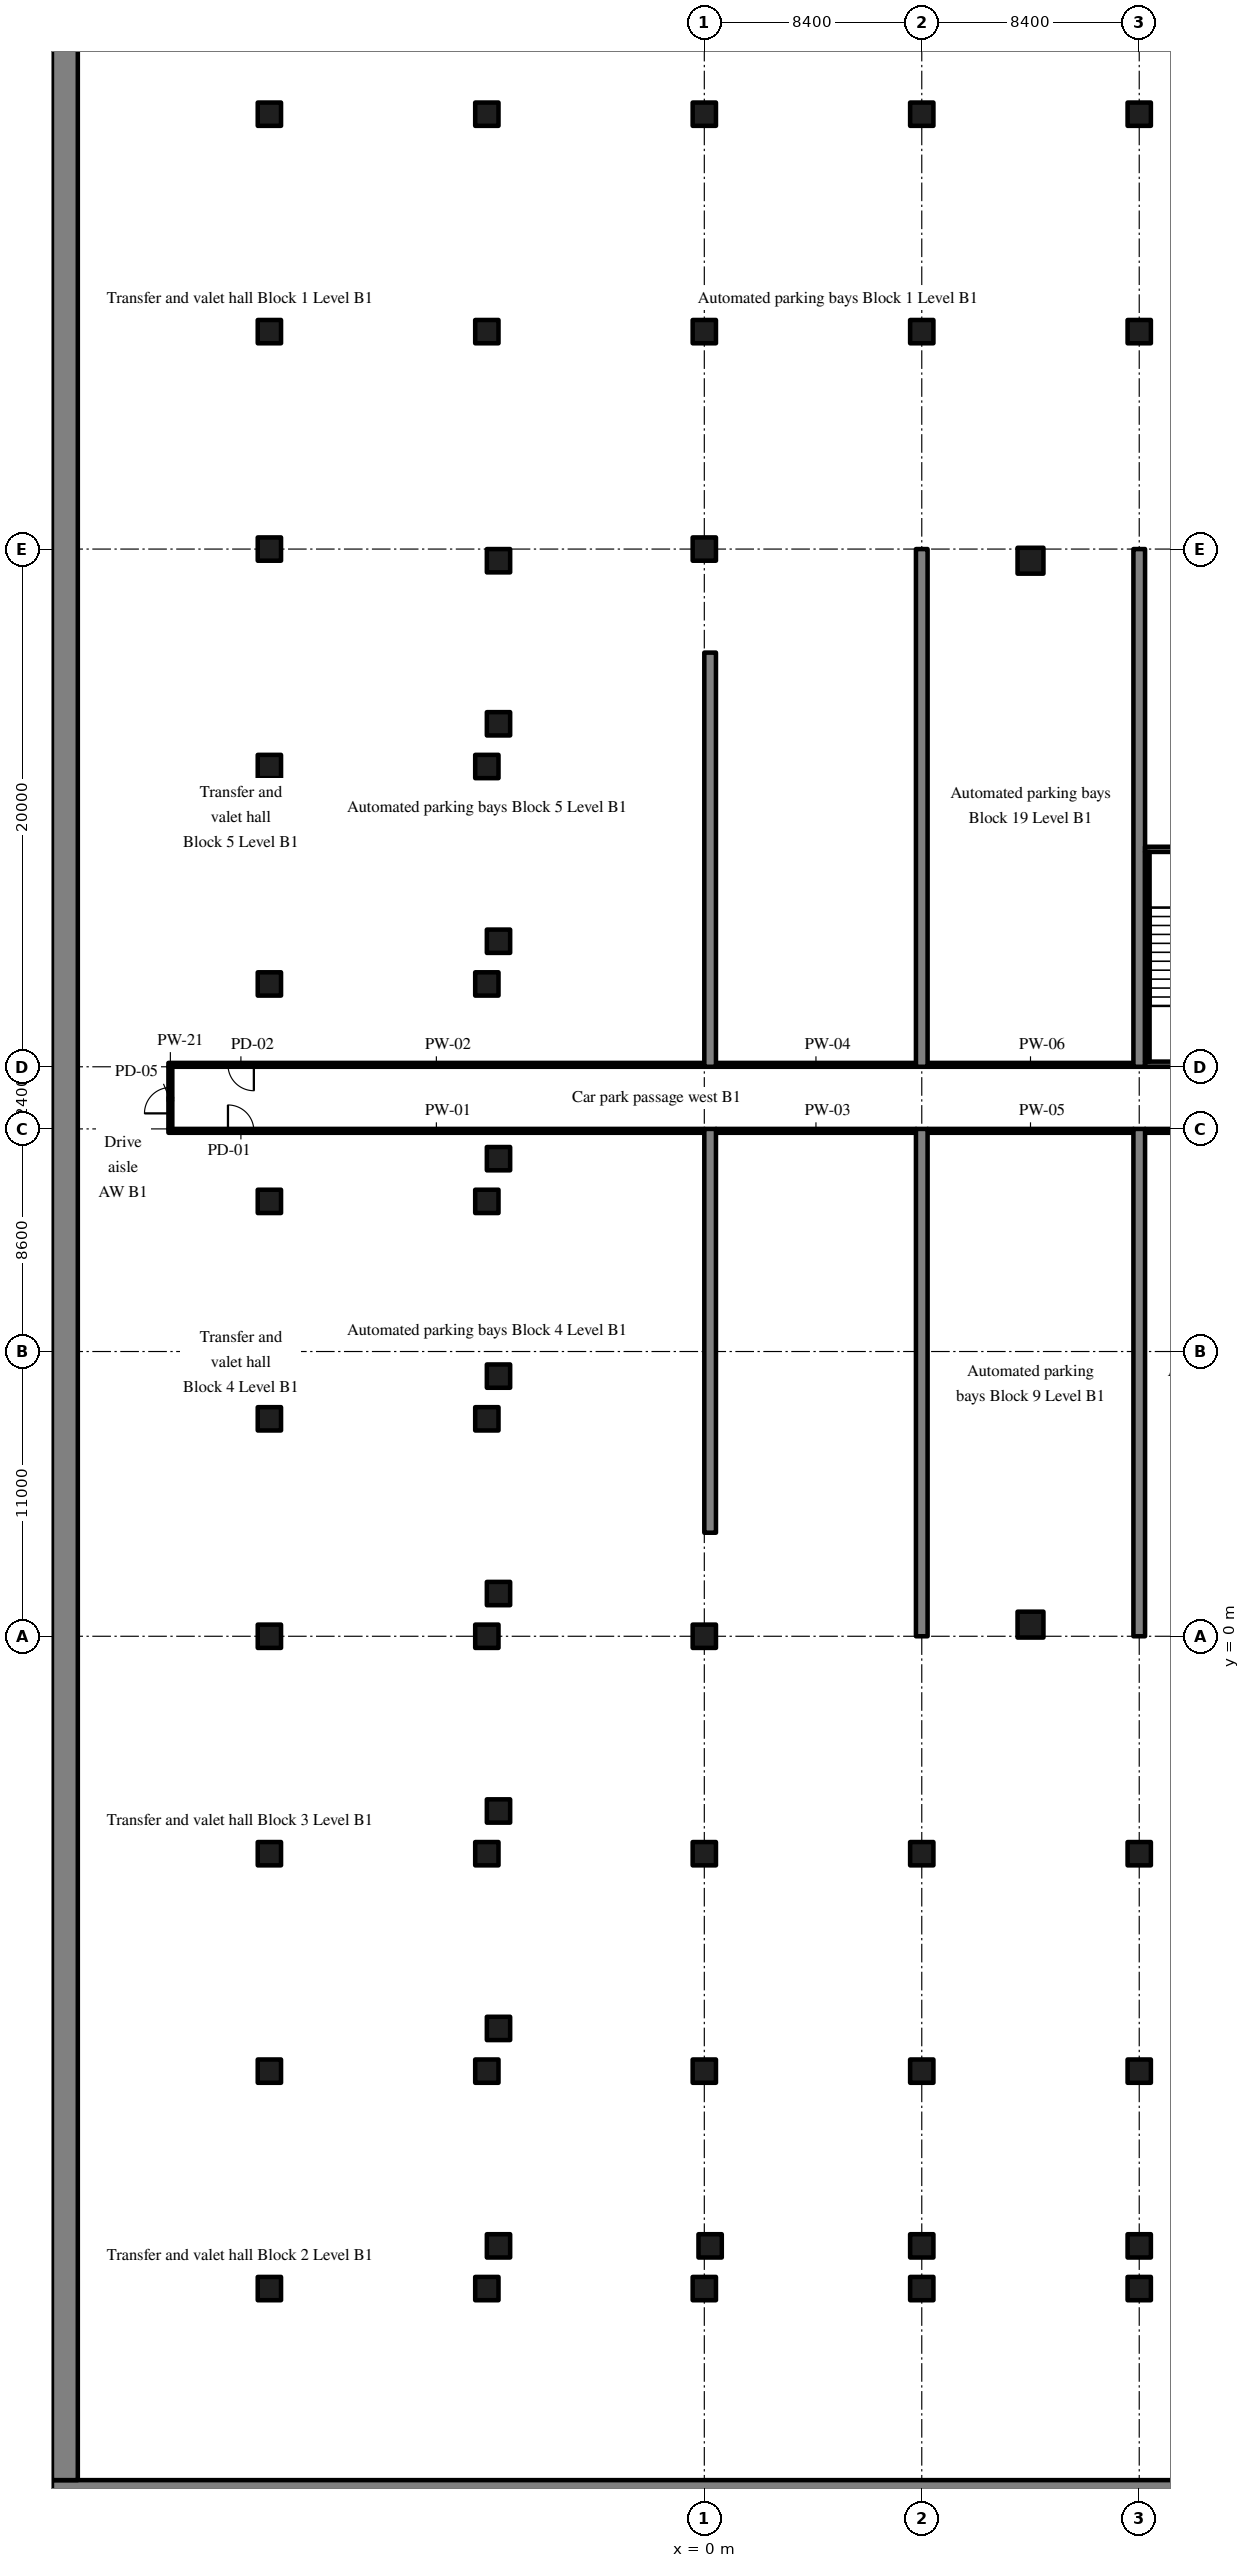
"""IFC4 building model, lengths in metres.
Left out: names, types, materials, properties, quantities, classifications, styles, units other than length and angle.
Written with IfcOpenShell. Run it as: python <this file> out.ifc"""

import sys

from ifc_helpers import new_model, si_unit, direction, frame, frame_2d, origin, origin_2d, place, context, subcontext, project, spatial, rectangle, extrude, source, transform, mapped, element, fill, save


model = new_model("IFC4")
c1 = context("Model", 3, precision=1e-05, world=origin(), true_north=direction((0.0, 1.0)))
c2 = subcontext(c1, "Body", "Model", "MODEL_VIEW")
j1 = project(units=[si_unit("LENGTHUNIT", "METRE"), si_unit("PLANEANGLEUNIT", "RADIAN")], contexts=[c1])
p1 = place(None, origin())
s1 = spatial("IfcSite", under=j1, at=p1, CompositionType="ELEMENT")
p2 = place(p1, origin())
s2 = spatial("IfcBuilding", under=s1, at=p2, CompositionType="ELEMENT")
p3 = place(p2, frame((0.0, 0.0, -4.5)))
s3 = spatial("IfcBuildingStorey", under=s2, at=p3, CompositionType="ELEMENT", Elevation=-4.5)
m1 = source(origin(), c2, "Body", "SweptSolid", [
    extrude(rectangle(XDim=151.2, YDim=1.0, at=frame_2d((75.6, 0.0))), origin(), (0.0, 0.0, 1.0), 4.22),
])
p4 = place(p3, frame((-25.2, -33.1, 0.0), z_axis=(0.0, 0.0, 1.0), x_axis=(1.0, 0.0, 0.0)))
e1 = element("IfcWall", 1, at=p4, inside=s3, PredefinedType="SHEAR", context=c2, shape_type="MappedRepresentation", body=[
    mapped(m1, transform((0.0, 0.0, 0.0), scale=1.0)),
])
m2 = source(origin(), c2, "Body", "SweptSolid", [
    extrude(rectangle(XDim=98.8, YDim=1.0, at=frame_2d((49.4, 0.0))), origin(), (0.0, 0.0, 1.0), 4.22),
])
p5 = place(p3, frame((-24.7, -32.6, 0.0), z_axis=(0.0, 0.0, 1.0), x_axis=(0.0, 1.0, 0.0)))
e2 = element("IfcWall", 2, at=p5, inside=s3, PredefinedType="SHEAR", context=c2, shape_type="MappedRepresentation", body=[
    mapped(m2, transform((0.0, 0.0, 0.0), scale=1.0)),
])
m3 = source(origin(), c2, "Body", "SweptSolid", [
    extrude(rectangle(XDim=15.6, YDim=0.45, at=frame_2d((7.8, 0.0))), origin(), (0.0, 0.0, 1.0), 4.22),
])
p6 = place(p3, frame((0.225, 4.0, 0.0), z_axis=(0.0, 0.0, 1.0), x_axis=(0.0, 1.0, 0.0)))
e3 = element("IfcWall", 3, at=p6, inside=s3, PredefinedType="SHEAR", context=c2, shape_type="MappedRepresentation", body=[
    mapped(m3, transform((0.0, 0.0, 0.0), scale=1.0)),
])
m4 = source(origin(), c2, "Body", "SweptSolid", [
    extrude(rectangle(XDim=16.0, YDim=0.45, at=frame_2d((8.0, 0.0))), origin(), (0.0, 0.0, 1.0), 4.22),
])
p7 = place(p3, frame((0.225, 22.0, 0.0), z_axis=(0.0, 0.0, 1.0), x_axis=(0.0, 1.0, 0.0)))
e4 = element("IfcWall", 4, at=p7, inside=s3, PredefinedType="SHEAR", context=c2, shape_type="MappedRepresentation", body=[
    mapped(m4, transform((0.0, 0.0, 0.0), scale=1.0)),
])
m5 = source(origin(), c2, "Body", "SweptSolid", [
    extrude(rectangle(XDim=19.6, YDim=0.45, at=frame_2d((9.8, 0.0))), origin(), (0.0, 0.0, 1.0), 4.22),
])
p8 = place(p3, frame((8.4, 0.0, 0.0), z_axis=(0.0, 0.0, 1.0), x_axis=(0.0, 1.0, 0.0)))
e5 = element("IfcWall", 5, at=p8, inside=s3, PredefinedType="SHEAR", context=c2, shape_type="MappedRepresentation", body=[
    mapped(m5, transform((0.0, 0.0, 0.0), scale=1.0)),
])
m6 = source(origin(), c2, "Body", "SweptSolid", [
    extrude(rectangle(XDim=20.0, YDim=0.45, at=frame_2d((10.0, 0.0))), origin(), (0.0, 0.0, 1.0), 4.22),
])
p9 = place(p3, frame((8.4, 22.0, 0.0), z_axis=(0.0, 0.0, 1.0), x_axis=(0.0, 1.0, 0.0)))
e6 = element("IfcWall", 6, at=p9, inside=s3, PredefinedType="SHEAR", context=c2, shape_type="MappedRepresentation", body=[
    mapped(m6, transform((0.0, 0.0, 0.0), scale=1.0)),
])
p10 = place(p3, frame((16.8, 0.0, 0.0), z_axis=(0.0, 0.0, 1.0), x_axis=(0.0, 1.0, 0.0)))
e7 = element("IfcWall", 7, at=p10, inside=s3, PredefinedType="SHEAR", context=c2, shape_type="MappedRepresentation", body=[
    mapped(m5, transform((0.0, 0.0, 0.0), scale=1.0)),
])
p11 = place(p3, frame((16.8, 22.0, 0.0), z_axis=(0.0, 0.0, 1.0), x_axis=(0.0, 1.0, 0.0)))
e8 = element("IfcWall", 8, at=p11, inside=s3, PredefinedType="SHEAR", context=c2, shape_type="MappedRepresentation", body=[
    mapped(m6, transform((0.0, 0.0, 0.0), scale=1.0)),
])
m7 = source(origin(), c2, "Body", "SweptSolid", [
    extrude(rectangle(XDim=1.0, YDim=1.0, at=origin_2d()), origin(), (0.0, 0.0, 1.0), 4.22),
])
for number, where, z_axis, x_axis in (
    (9, (12.6, 0.45, 0.0), (0.0, 0.0, 1.0), (1.0, 0.0, 0.0)),
    (10, (12.6, 41.55, 0.0), (0.0, 0.0, 1.0), (1.0, 0.0, 0.0)),
):
    element("IfcColumn", number, at=place(p3, frame(where, z_axis=z_axis, x_axis=x_axis)), inside=s3, PredefinedType="COLUMN", context=c2, shape_type="MappedRepresentation", body=[
        mapped(m7, transform((0.0, 0.0, 0.0), scale=1.0)),
    ])
m8 = source(origin(), c2, "Body", "SweptSolid", [
    extrude(rectangle(XDim=0.9, YDim=0.9, at=origin_2d()), origin(), (0.0, 0.0, 1.0), 4.22),
])
for number, where, z_axis, x_axis in (
    (11, (-7.95, -23.55, 0.0), (0.0, 0.0, 1.0), (1.0, 0.0, 0.0)),
    (12, (-7.95, -15.15, 0.0), (0.0, 0.0, 1.0), (1.0, 0.0, 0.0)),
    (13, (-7.95, -6.75, 0.0), (0.0, 0.0, 1.0), (1.0, 0.0, 0.0)),
    (14, (-7.95, 1.65, 0.0), (0.0, 0.0, 1.0), (1.0, 0.0, 0.0)),
    (15, (-7.95, 10.05, 0.0), (0.0, 0.0, 1.0), (1.0, 0.0, 0.0)),
    (16, (-7.95, 18.45, 0.0), (0.0, 0.0, 1.0), (1.0, 0.0, 0.0)),
    (17, (-7.95, 26.85, 0.0), (0.0, 0.0, 1.0), (1.0, 0.0, 0.0)),
    (18, (-7.95, 35.25, 0.0), (0.0, 0.0, 1.0), (1.0, 0.0, 0.0)),
    (19, (-7.95, 41.55, 0.0), (0.0, 0.0, 1.0), (1.0, 0.0, 0.0)),
    (20, (0.225, -23.55, 0.0), (0.0, 0.0, 1.0), (1.0, 0.0, 0.0)),
    (21, (8.4, -23.55, 0.0), (0.0, 0.0, 1.0), (1.0, 0.0, 0.0)),
    (22, (16.8, -23.55, 0.0), (0.0, 0.0, 1.0), (1.0, 0.0, 0.0)),
    (23, (-16.8, -25.2, 0.0), (0.0, 0.0, 1.0), (1.0, 0.0, 0.0)),
    (24, (-16.8, -16.8, 0.0), (0.0, 0.0, 1.0), (1.0, 0.0, 0.0)),
    (25, (-16.8, -8.4, 0.0), (0.0, 0.0, 1.0), (1.0, 0.0, 0.0)),
    (26, (-16.8, 0.0, 0.0), (0.0, 0.0, 1.0), (1.0, 0.0, 0.0)),
    (27, (-16.8, 8.4, 0.0), (0.0, 0.0, 1.0), (1.0, 0.0, 0.0)),
    (28, (-16.8, 16.8, 0.0), (0.0, 0.0, 1.0), (1.0, 0.0, 0.0)),
    (29, (-16.8, 25.2, 0.0), (0.0, 0.0, 1.0), (1.0, 0.0, 0.0)),
    (30, (-16.8, 33.6, 0.0), (0.0, 0.0, 1.0), (1.0, 0.0, 0.0)),
    (31, (-16.8, 42.0, 0.0), (0.0, 0.0, 1.0), (1.0, 0.0, 0.0)),
    (32, (-16.8, 50.4, 0.0), (0.0, 0.0, 1.0), (1.0, 0.0, 0.0)),
    (33, (-16.8, 58.8, 0.0), (0.0, 0.0, 1.0), (1.0, 0.0, 0.0)),
    (34, (-8.4, -25.2, 0.0), (0.0, 0.0, 1.0), (1.0, 0.0, 0.0)),
    (35, (-8.4, -16.8, 0.0), (0.0, 0.0, 1.0), (1.0, 0.0, 0.0)),
    (36, (-8.4, -8.4, 0.0), (0.0, 0.0, 1.0), (1.0, 0.0, 0.0)),
    (37, (-8.4, 0.0, 0.0), (0.0, 0.0, 1.0), (1.0, 0.0, 0.0)),
    (38, (-8.4, 8.4, 0.0), (0.0, 0.0, 1.0), (1.0, 0.0, 0.0)),
    (39, (-8.4, 16.8, 0.0), (0.0, 0.0, 1.0), (1.0, 0.0, 0.0)),
    (40, (-8.4, 25.2, 0.0), (0.0, 0.0, 1.0), (1.0, 0.0, 0.0)),
    (41, (-8.4, 33.6, 0.0), (0.0, 0.0, 1.0), (1.0, 0.0, 0.0)),
    (42, (-8.4, 50.4, 0.0), (0.0, 0.0, 1.0), (1.0, 0.0, 0.0)),
    (43, (-8.4, 58.8, 0.0), (0.0, 0.0, 1.0), (1.0, 0.0, 0.0)),
    (44, (0.0, -25.2, 0.0), (0.0, 0.0, 1.0), (1.0, 0.0, 0.0)),
    (45, (0.0, -16.8, 0.0), (0.0, 0.0, 1.0), (1.0, 0.0, 0.0)),
    (46, (0.0, -8.4, 0.0), (0.0, 0.0, 1.0), (1.0, 0.0, 0.0)),
    (47, (0.0, 0.0, 0.0), (0.0, 0.0, 1.0), (1.0, 0.0, 0.0)),
    (48, (0.0, 42.0, 0.0), (0.0, 0.0, 1.0), (1.0, 0.0, 0.0)),
    (49, (0.0, 50.4, 0.0), (0.0, 0.0, 1.0), (1.0, 0.0, 0.0)),
    (50, (0.0, 58.8, 0.0), (0.0, 0.0, 1.0), (1.0, 0.0, 0.0)),
    (51, (8.4, -25.2, 0.0), (0.0, 0.0, 1.0), (1.0, 0.0, 0.0)),
    (52, (8.4, -16.8, 0.0), (0.0, 0.0, 1.0), (1.0, 0.0, 0.0)),
    (53, (8.4, -8.4, 0.0), (0.0, 0.0, 1.0), (1.0, 0.0, 0.0)),
    (54, (8.4, 50.4, 0.0), (0.0, 0.0, 1.0), (1.0, 0.0, 0.0)),
    (55, (8.4, 58.8, 0.0), (0.0, 0.0, 1.0), (1.0, 0.0, 0.0)),
    (56, (16.8, -25.2, 0.0), (0.0, 0.0, 1.0), (1.0, 0.0, 0.0)),
    (57, (16.8, -16.8, 0.0), (0.0, 0.0, 1.0), (1.0, 0.0, 0.0)),
    (58, (16.8, -8.4, 0.0), (0.0, 0.0, 1.0), (1.0, 0.0, 0.0)),
    (59, (16.8, 50.4, 0.0), (0.0, 0.0, 1.0), (1.0, 0.0, 0.0)),
    (60, (16.8, 58.8, 0.0), (0.0, 0.0, 1.0), (1.0, 0.0, 0.0)),
):
    element("IfcColumn", number, at=place(p3, frame(where, z_axis=z_axis, x_axis=x_axis)), inside=s3, PredefinedType="COLUMN", context=c2, shape_type="MappedRepresentation", body=[
        mapped(m8, transform((0.0, 0.0, 0.0), scale=1.0)),
    ])
m9 = source(origin(), c2, "Body", "SweptSolid", [
    extrude(rectangle(XDim=8.175, YDim=0.2, at=frame_2d((4.087, 0.0))), origin(), (0.0, 0.0, 1.0), 4.22),
])
p12 = place(p3, frame((17.025, 22.1, 0.0), z_axis=(0.0, 0.0, 1.0), x_axis=(1.0, 0.0, 0.0)))
e61 = element("IfcWall", 61, at=p12, inside=s3, PredefinedType="SOLIDWALL", context=c2, shape_type="MappedRepresentation", body=[
    mapped(m9, transform((0.0, 0.0, 0.0), scale=1.0)),
])
m10 = source(origin(), c2, "Body", "SweptSolid", [
    extrude(rectangle(XDim=1.2, YDim=2.1, at=frame_2d((0.6, 1.05))), frame((0.0, 0.11, 0.0), z_axis=(0.0, -1.0, 0.0), x_axis=(1.0, 0.0, 0.0)), (0.0, 0.0, 1.0), 0.22),
])
p13 = place(p12, frame((5.975, 0.0, 0.0)))
e62 = element("IfcOpeningElement", 62, at=p13, cuts=e61, PredefinedType="OPENING", context=c2, shape_type="MappedRepresentation", body=[
    mapped(m10, transform((0.0, 0.0, 0.0), scale=1.0)),
])
p14 = place(p3, frame((17.025, 30.4, 0.0), z_axis=(0.0, 0.0, 1.0), x_axis=(1.0, 0.0, 0.0)))
e63 = element("IfcWall", 63, at=p14, inside=s3, PredefinedType="SOLIDWALL", context=c2, shape_type="MappedRepresentation", body=[
    mapped(m9, transform((0.0, 0.0, 0.0), scale=1.0)),
])
m11 = source(origin(), c2, "Body", "SweptSolid", [
    extrude(rectangle(XDim=1.0, YDim=2.1, at=frame_2d((0.5, 1.05))), frame((0.0, 0.11, 0.0), z_axis=(0.0, -1.0, 0.0), x_axis=(1.0, 0.0, 0.0)), (0.0, 0.0, 1.0), 0.22),
])
p15 = place(p14, frame((6.075, 0.0, 0.0)))
e64 = element("IfcOpeningElement", 64, at=p15, cuts=e63, PredefinedType="OPENING", context=c2, shape_type="MappedRepresentation", body=[
    mapped(m11, transform((0.0, 0.0, 0.0), scale=1.0)),
])
m12 = source(origin(), c2, "Body", "SweptSolid", [
    extrude(rectangle(XDim=8.1, YDim=0.175, at=frame_2d((4.05, 0.0))), origin(), (0.0, 0.0, 1.0), 4.22),
])
p16 = place(p3, frame((17.112, 22.2, 0.0), z_axis=(0.0, 0.0, 1.0), x_axis=(0.0, 1.0, 0.0)))
e65 = element("IfcWall", 65, at=p16, inside=s3, PredefinedType="SOLIDWALL", context=c2, shape_type="MappedRepresentation", body=[
    mapped(m12, transform((0.0, 0.0, 0.0), scale=1.0)),
])
m13 = source(origin(), c2, "Body", "SweptSolid", [
    extrude(rectangle(XDim=20.7, YDim=0.15, at=frame_2d((10.35, 0.0))), origin(), (0.0, 0.0, 1.0), 4.22),
])
p17 = place(p3, frame((-20.7, 19.525, 0.0), z_axis=(0.0, 0.0, 1.0), x_axis=(1.0, 0.0, 0.0)))
e66 = element("IfcWall", 66, at=p17, inside=s3, PredefinedType="PARTITIONING", context=c2, shape_type="MappedRepresentation", body=[
    mapped(m13, transform((0.0, 0.0, 0.0), scale=1.0)),
])
m14 = source(origin(), c2, "Body", "SweptSolid", [
    extrude(rectangle(XDim=1.0, YDim=2.1, at=frame_2d((0.5, 1.05))), frame((0.0, 0.085, 0.0), z_axis=(0.0, -1.0, 0.0), x_axis=(1.0, 0.0, 0.0)), (0.0, 0.0, 1.0), 0.17),
])
p18 = place(p17, frame((2.3, 0.0, 0.0)))
e67 = element("IfcOpeningElement", 67, at=p18, cuts=e66, PredefinedType="OPENING", context=c2, shape_type="MappedRepresentation", body=[
    mapped(m14, transform((0.0, 0.0, 0.0), scale=1.0)),
])
p19 = place(p3, frame((-20.7, 22.075, 0.0), z_axis=(0.0, 0.0, 1.0), x_axis=(1.0, 0.0, 0.0)))
e68 = element("IfcWall", 68, at=p19, inside=s3, PredefinedType="PARTITIONING", context=c2, shape_type="MappedRepresentation", body=[
    mapped(m13, transform((0.0, 0.0, 0.0), scale=1.0)),
])
p20 = place(p19, frame((2.3, 0.0, 0.0)))
e69 = element("IfcOpeningElement", 69, at=p20, cuts=e68, PredefinedType="OPENING", context=c2, shape_type="MappedRepresentation", body=[
    mapped(m14, transform((0.0, 0.0, 0.0), scale=1.0)),
])
m15 = source(origin(), c2, "Body", "SweptSolid", [
    extrude(rectangle(XDim=7.725, YDim=0.15, at=frame_2d((3.863, 0.0))), origin(), (0.0, 0.0, 1.0), 4.22),
])
for number, where, z_axis, x_axis in (
    (70, (0.45, 19.525, 0.0), (0.0, 0.0, 1.0), (1.0, 0.0, 0.0)),
    (71, (0.45, 22.075, 0.0), (0.0, 0.0, 1.0), (1.0, 0.0, 0.0)),
):
    element("IfcWall", number, at=place(p3, frame(where, z_axis=z_axis, x_axis=x_axis)), inside=s3, PredefinedType="PARTITIONING", context=c2, shape_type="MappedRepresentation", body=[
        mapped(m15, transform((0.0, 0.0, 0.0), scale=1.0)),
    ])
m16 = source(origin(), c2, "Body", "SweptSolid", [
    extrude(rectangle(XDim=7.95, YDim=0.15, at=frame_2d((3.975, 0.0))), origin(), (0.0, 0.0, 1.0), 4.22),
])
for number, where, z_axis, x_axis in (
    (72, (8.625, 19.525, 0.0), (0.0, 0.0, 1.0), (1.0, 0.0, 0.0)),
    (73, (8.625, 22.075, 0.0), (0.0, 0.0, 1.0), (1.0, 0.0, 0.0)),
):
    element("IfcWall", number, at=place(p3, frame(where, z_axis=z_axis, x_axis=x_axis)), inside=s3, PredefinedType="PARTITIONING", context=c2, shape_type="MappedRepresentation", body=[
        mapped(m16, transform((0.0, 0.0, 0.0), scale=1.0)),
    ])
m17 = source(origin(), c2, "Body", "SweptSolid", [
    extrude(rectangle(XDim=7.95, YDim=0.15, at=frame_2d((3.975, 0.0))), origin(), (0.0, 0.0, 1.0), 4.22),
])
p21 = place(p3, frame((17.025, 19.525, 0.0), z_axis=(0.0, 0.0, 1.0), x_axis=(1.0, 0.0, 0.0)))
e74 = element("IfcWall", 74, at=p21, inside=s3, PredefinedType="PARTITIONING", context=c2, shape_type="MappedRepresentation", body=[
    mapped(m17, transform((0.0, 0.0, 0.0), scale=1.0)),
])
m18 = source(origin(), c2, "Body", "SweptSolid", [
    extrude(rectangle(XDim=2.4, YDim=0.15, at=frame_2d((1.2, 0.0))), origin(), (0.0, 0.0, 1.0), 4.22),
])
p22 = place(p3, frame((-20.625, 19.6, 0.0), z_axis=(0.0, 0.0, 1.0), x_axis=(0.0, 1.0, 0.0)))
e75 = element("IfcWall", 75, at=p22, inside=s3, PredefinedType="PARTITIONING", context=c2, shape_type="MappedRepresentation", body=[
    mapped(m18, transform((0.0, 0.0, 0.0), scale=1.0)),
])
p23 = place(p22, frame((0.6, 0.0, 0.0)))
e76 = element("IfcOpeningElement", 76, at=p23, cuts=e75, PredefinedType="OPENING", context=c2, shape_type="MappedRepresentation", body=[
    mapped(m14, transform((0.0, 0.0, 0.0), scale=1.0)),
])
m19 = source(origin(), c2, "Body", "SweptSolid", [
    extrude(rectangle(XDim=1.0, YDim=2.1, at=frame_2d((0.5, 1.05))), frame((0.0, 0.025, 0.0), z_axis=(0.0, -1.0, 0.0), x_axis=(1.0, 0.0, 0.0)), (0.0, 0.0, 1.0), 0.05),
])
p24 = place(p18, origin())
e77 = element("IfcDoor", 77, at=p24, inside=s3, OperationType="SINGLE_SWING_LEFT", PredefinedType="DOOR", context=c2, shape_type="MappedRepresentation", body=[
    mapped(m19, transform((0.0, 0.0, 0.0), scale=1.0)),
])
fill(e67, e77)
p25 = place(p20, origin())
e78 = element("IfcDoor", 78, at=p25, inside=s3, OperationType="SINGLE_SWING_RIGHT", PredefinedType="DOOR", context=c2, shape_type="MappedRepresentation", body=[
    mapped(m19, transform((0.0, 0.0, 0.0), scale=1.0)),
])
fill(e69, e78)
p26 = place(p23, origin())
e79 = element("IfcDoor", 79, at=p26, inside=s3, OperationType="SINGLE_SWING_LEFT", PredefinedType="DOOR", context=c2, shape_type="MappedRepresentation", body=[
    mapped(m19, transform((0.0, 0.0, 0.0), scale=1.0)),
])
fill(e76, e79)
save(model, sys.argv[1])
